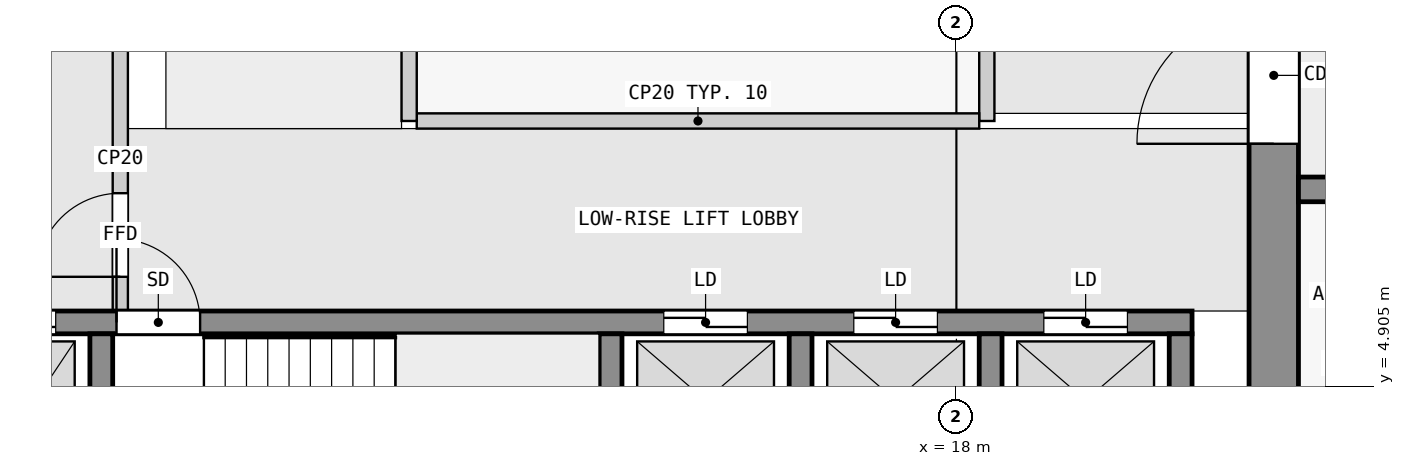
"""IFC4 building model, lengths in metres.
Left out: names, types, materials, properties, quantities, classifications, styles, units other than length and angle.
Written with IfcOpenShell. Run it as: python <this file> out.ifc"""

import sys

from ifc_helpers import new_model, si_unit, direction, frame, frame_2d, origin, place, context, subcontext, project, spatial, rectangle, extrude, element, fill, save


model = new_model("IFC4")
c1 = context("Model", 3, precision=1e-05, world=origin(), true_north=direction((0.0, 1.0)))
c2 = subcontext(c1, "Body", "Model", "MODEL_VIEW")
j1 = project(units=[si_unit("LENGTHUNIT", "METRE"), si_unit("PLANEANGLEUNIT", "RADIAN")], contexts=[c1])
p1 = place(None, origin())
s1 = spatial("IfcSite", under=j1, at=p1, CompositionType="ELEMENT")
p2 = place(p1, origin())
s2 = spatial("IfcBuilding", under=s1, at=p2, CompositionType="ELEMENT")
p3 = place(p2, frame((0.0, 0.0, 102.8)))
s3 = spatial("IfcBuildingStorey", under=s2, at=p3, CompositionType="ELEMENT", Elevation=102.8)
p4 = place(p3, frame((22.175, 2.5, 0.0), z_axis=(0.0, 0.0, 1.0), x_axis=(0.0, 1.0, 0.0)))
e1 = element("IfcWall", 1, at=p4, inside=s3, PredefinedType="SHEAR", context=c2, shape_type="SweptSolid", body=[
    extrude(rectangle(XDim=14.85, YDim=0.65, at=frame_2d((7.425, 0.0))), origin(), (0.0, 0.0, 1.0), 3.25),
])
p5 = place(p4, frame((5.6, 0.0, 0.0)))
e2 = element("IfcOpeningElement", 2, at=p5, cuts=e1, PredefinedType="OPENING", context=c2, shape_type="SweptSolid", body=[
    extrude(rectangle(XDim=1.8, YDim=2.1, at=frame_2d((0.9, 1.05))), frame((0.0, 0.335, 0.0), z_axis=(0.0, -1.0, 0.0), x_axis=(1.0, 0.0, 0.0)), (0.0, 0.0, 1.0), 0.67),
])
for number, where, z_axis, x_axis in (
    (3, (6.75, 2.8, 0.0), (0.0, 0.0, 1.0), (0.0, 1.0, 0.0)),
    (4, (13.45, 2.8, 0.0), (0.0, 0.0, 1.0), (0.0, 1.0, 0.0)),
    (5, (15.95, 2.8, 0.0), (0.0, 0.0, 1.0), (0.0, 1.0, 0.0)),
    (6, (18.45, 2.8, 0.0), (0.0, 0.0, 1.0), (0.0, 1.0, 0.0)),
    (7, (20.95, 2.8, 0.0), (0.0, 0.0, 1.0), (0.0, 1.0, 0.0)),
):
    element("IfcWall", number, at=place(p3, frame(where, z_axis=z_axis, x_axis=x_axis)), inside=s3, PredefinedType="SHEAR", context=c2, shape_type="SweptSolid", body=[
        extrude(rectangle(XDim=2.8, YDim=0.3, at=frame_2d((1.4, 0.0))), origin(), (0.0, 0.0, 1.0), 3.25),
    ])
p6 = place(p3, frame((2.3, 5.75, 0.0), z_axis=(0.0, 0.0, 1.0), x_axis=(1.0, 0.0, 0.0)))
e8 = element("IfcWall", 8, at=p6, inside=s3, PredefinedType="SHEAR", context=c2, shape_type="SweptSolid", body=[
    extrude(rectangle(XDim=18.8, YDim=0.3, at=frame_2d((9.4, 0.0))), origin(), (0.0, 0.0, 1.0), 3.25),
])
p7 = place(p6, frame((4.65, 0.0, 0.0)))
e9 = element("IfcOpeningElement", 9, at=p7, cuts=e8, PredefinedType="OPENING", context=c2, shape_type="SweptSolid", body=[
    extrude(rectangle(XDim=1.1, YDim=2.1, at=frame_2d((0.55, 1.05))), frame((0.0, 0.16, 0.0), z_axis=(0.0, -1.0, 0.0), x_axis=(1.0, 0.0, 0.0)), (0.0, 0.0, 1.0), 0.32),
])
p8 = place(p6, frame((0.45, 0.0, 0.0)))
e10 = element("IfcOpeningElement", 10, at=p8, cuts=e8, PredefinedType="OPENING", context=c2, shape_type="SweptSolid", body=[
    extrude(rectangle(XDim=1.1, YDim=2.1, at=frame_2d((0.55, 1.05))), frame((0.0, 0.16, 0.0), z_axis=(0.0, -1.0, 0.0), x_axis=(1.0, 0.0, 0.0)), (0.0, 0.0, 1.0), 0.32),
])
p9 = place(p6, frame((2.75, 0.0, 0.0)))
e11 = element("IfcOpeningElement", 11, at=p9, cuts=e8, PredefinedType="OPENING", context=c2, shape_type="SweptSolid", body=[
    extrude(rectangle(XDim=1.1, YDim=2.1, at=frame_2d((0.55, 1.05))), frame((0.0, 0.16, 0.0), z_axis=(0.0, -1.0, 0.0), x_axis=(1.0, 0.0, 0.0)), (0.0, 0.0, 1.0), 0.32),
])
p10 = place(p6, frame((11.85, 0.0, 0.0)))
e12 = element("IfcOpeningElement", 12, at=p10, cuts=e8, PredefinedType="OPENING", context=c2, shape_type="SweptSolid", body=[
    extrude(rectangle(XDim=1.1, YDim=2.1, at=frame_2d((0.55, 1.05))), frame((0.0, 0.16, 0.0), z_axis=(0.0, -1.0, 0.0), x_axis=(1.0, 0.0, 0.0)), (0.0, 0.0, 1.0), 0.32),
])
p11 = place(p6, frame((14.35, 0.0, 0.0)))
e13 = element("IfcOpeningElement", 13, at=p11, cuts=e8, PredefinedType="OPENING", context=c2, shape_type="SweptSolid", body=[
    extrude(rectangle(XDim=1.1, YDim=2.1, at=frame_2d((0.55, 1.05))), frame((0.0, 0.16, 0.0), z_axis=(0.0, -1.0, 0.0), x_axis=(1.0, 0.0, 0.0)), (0.0, 0.0, 1.0), 0.32),
])
p12 = place(p6, frame((16.85, 0.0, 0.0)))
e14 = element("IfcOpeningElement", 14, at=p12, cuts=e8, PredefinedType="OPENING", context=c2, shape_type="SweptSolid", body=[
    extrude(rectangle(XDim=1.1, YDim=2.1, at=frame_2d((0.55, 1.05))), frame((0.0, 0.16, 0.0), z_axis=(0.0, -1.0, 0.0), x_axis=(1.0, 0.0, 0.0)), (0.0, 0.0, 1.0), 0.32),
])
p13 = place(p3, frame((22.5, 7.5, 0.0), z_axis=(0.0, 0.0, 1.0), x_axis=(1.0, 0.0, 0.0)))
e15 = element("IfcWall", 15, at=p13, inside=s3, PredefinedType="SHEAR", context=c2, shape_type="SweptSolid", body=[
    extrude(rectangle(XDim=22.5, YDim=0.325, at=frame_2d((11.25, 0.0))), origin(), (0.0, 0.0, 1.0), 3.25),
])
p14 = place(p13, frame((4.05, 0.0, 0.0)))
e16 = element("IfcOpeningElement", 16, at=p14, cuts=e15, PredefinedType="OPENING", context=c2, shape_type="SweptSolid", body=[
    extrude(rectangle(XDim=1.0, YDim=2.1, at=frame_2d((0.5, 1.05))), frame((0.0, 0.172, 0.0), z_axis=(0.0, -1.0, 0.0), x_axis=(1.0, 0.0, 0.0)), (0.0, 0.0, 1.0), 0.345),
])
p15 = place(p13, frame((10.75, 0.0, 0.0)))
e17 = element("IfcOpeningElement", 17, at=p15, cuts=e15, PredefinedType="OPENING", context=c2, shape_type="SweptSolid", body=[
    extrude(rectangle(XDim=1.0, YDim=2.1, at=frame_2d((0.5, 1.05))), frame((0.0, 0.172, 0.0), z_axis=(0.0, -1.0, 0.0), x_axis=(1.0, 0.0, 0.0)), (0.0, 0.0, 1.0), 0.345),
])
p16 = place(p13, frame((16.85, 0.0, 0.0)))
e18 = element("IfcOpeningElement", 18, at=p16, cuts=e15, PredefinedType="OPENING", context=c2, shape_type="SweptSolid", body=[
    extrude(rectangle(XDim=1.0, YDim=2.1, at=frame_2d((0.5, 1.05))), frame((0.0, 0.172, 0.0), z_axis=(0.0, -1.0, 0.0), x_axis=(1.0, 0.0, 0.0)), (0.0, 0.0, 1.0), 0.345),
])
p17 = place(p3, frame((7.0, 5.9, 0.0), z_axis=(0.0, 0.0, 1.0), x_axis=(0.0, 1.0, 0.0)))
e19 = element("IfcWall", 19, at=p17, inside=s3, PredefinedType="PARTITIONING", context=c2, shape_type="SweptSolid", body=[
    extrude(rectangle(XDim=4.0, YDim=0.2, at=frame_2d((2.0, 0.0))), origin(), (0.0, 0.0, 1.0), 3.25),
])
p18 = place(p17, frame((0.45, 0.0, 0.0)))
e20 = element("IfcOpeningElement", 20, at=p18, cuts=e19, PredefinedType="OPENING", context=c2, shape_type="SweptSolid", body=[
    extrude(rectangle(XDim=1.1, YDim=2.1, at=frame_2d((0.55, 1.05))), frame((0.0, 0.11, 0.0), z_axis=(0.0, -1.0, 0.0), x_axis=(1.0, 0.0, 0.0)), (0.0, 0.0, 1.0), 0.22),
])
p19 = place(p3, frame((10.8, 8.4, 0.0), z_axis=(0.0, 0.0, 1.0), x_axis=(0.0, 1.0, 0.0)))
e21 = element("IfcWall", 21, at=p19, inside=s3, PredefinedType="PARTITIONING", context=c2, shape_type="SweptSolid", body=[
    extrude(rectangle(XDim=6.2, YDim=0.2, at=frame_2d((3.1, 0.0))), origin(), (0.0, 0.0, 1.0), 3.25),
])
p20 = place(p3, frame((10.9, 8.4, 0.0), z_axis=(0.0, 0.0, 1.0), x_axis=(1.0, 0.0, 0.0)))
e22 = element("IfcWall", 22, at=p20, inside=s3, PredefinedType="PARTITIONING", context=c2, shape_type="SweptSolid", body=[
    extrude(rectangle(XDim=7.4, YDim=0.2, at=frame_2d((3.7, 0.0))), origin(), (0.0, 0.0, 1.0), 3.25),
])
p21 = place(p3, frame((18.4, 8.4, 0.0), z_axis=(0.0, 0.0, 1.0), x_axis=(0.0, 1.0, 0.0)))
e23 = element("IfcWall", 23, at=p21, inside=s3, PredefinedType="PARTITIONING", context=c2, shape_type="SweptSolid", body=[
    extrude(rectangle(XDim=6.2, YDim=0.2, at=frame_2d((3.1, 0.0))), origin(), (0.0, 0.0, 1.0), 3.25),
])
p22 = place(p21, frame((3.15, 0.0, 0.0)))
e24 = element("IfcOpeningElement", 24, at=p22, cuts=e23, PredefinedType="OPENING", context=c2, shape_type="SweptSolid", body=[
    extrude(rectangle(XDim=0.9, YDim=2.1, at=frame_2d((0.45, 1.05))), frame((0.0, 0.11, 0.0), z_axis=(0.0, -1.0, 0.0), x_axis=(1.0, 0.0, 0.0)), (0.0, 0.0, 1.0), 0.22),
])
p23 = place(p18, origin())
e25 = element("IfcDoor", 25, at=p23, inside=s3, OperationType="SINGLE_SWING_LEFT", PredefinedType="DOOR", context=c2, shape_type="SweptSolid", body=[
    extrude(rectangle(XDim=1.1, YDim=2.1, at=frame_2d((0.55, 1.05))), frame((0.0, 0.025, 0.0), z_axis=(0.0, -1.0, 0.0), x_axis=(1.0, 0.0, 0.0)), (0.0, 0.0, 1.0), 0.05),
])
fill(e20, e25)
p24 = place(p7, origin())
e26 = element("IfcDoor", 26, at=p24, inside=s3, OperationType="SINGLE_SWING_LEFT", PredefinedType="DOOR", context=c2, shape_type="SweptSolid", body=[
    extrude(rectangle(XDim=1.1, YDim=2.1, at=frame_2d((0.55, 1.05))), frame((0.0, 0.025, 0.0), z_axis=(0.0, -1.0, 0.0), x_axis=(1.0, 0.0, 0.0)), (0.0, 0.0, 1.0), 0.05),
])
fill(e9, e26)
p25 = place(p9, origin())
e27 = element("IfcDoor", 27, at=p25, inside=s3, OperationType="DOUBLE_DOOR_SLIDING", PredefinedType="DOOR", context=c2, shape_type="SweptSolid", body=[
    extrude(rectangle(XDim=1.1, YDim=2.1, at=frame_2d((0.55, 1.05))), frame((0.0, 0.025, 0.0), z_axis=(0.0, -1.0, 0.0), x_axis=(1.0, 0.0, 0.0)), (0.0, 0.0, 1.0), 0.05),
])
fill(e11, e27)
p26 = place(p10, origin())
e28 = element("IfcDoor", 28, at=p26, inside=s3, OperationType="DOUBLE_DOOR_SLIDING", PredefinedType="DOOR", context=c2, shape_type="SweptSolid", body=[
    extrude(rectangle(XDim=1.1, YDim=2.1, at=frame_2d((0.55, 1.05))), frame((0.0, 0.025, 0.0), z_axis=(0.0, -1.0, 0.0), x_axis=(1.0, 0.0, 0.0)), (0.0, 0.0, 1.0), 0.05),
])
fill(e12, e28)
p27 = place(p11, origin())
e29 = element("IfcDoor", 29, at=p27, inside=s3, OperationType="DOUBLE_DOOR_SLIDING", PredefinedType="DOOR", context=c2, shape_type="SweptSolid", body=[
    extrude(rectangle(XDim=1.1, YDim=2.1, at=frame_2d((0.55, 1.05))), frame((0.0, 0.025, 0.0), z_axis=(0.0, -1.0, 0.0), x_axis=(1.0, 0.0, 0.0)), (0.0, 0.0, 1.0), 0.05),
])
fill(e13, e29)
p28 = place(p12, origin())
e30 = element("IfcDoor", 30, at=p28, inside=s3, OperationType="DOUBLE_DOOR_SLIDING", PredefinedType="DOOR", context=c2, shape_type="SweptSolid", body=[
    extrude(rectangle(XDim=1.1, YDim=2.1, at=frame_2d((0.55, 1.05))), frame((0.0, 0.025, 0.0), z_axis=(0.0, -1.0, 0.0), x_axis=(1.0, 0.0, 0.0)), (0.0, 0.0, 1.0), 0.05),
])
fill(e14, e30)
p29 = place(p5, origin())
e31 = element("IfcDoor", 31, at=p29, inside=s3, OperationType="DOUBLE_DOOR_SINGLE_SWING", PredefinedType="DOOR", context=c2, shape_type="SweptSolid", body=[
    extrude(rectangle(XDim=1.8, YDim=2.1, at=frame_2d((0.9, 1.05))), frame((0.0, 0.025, 0.0), z_axis=(0.0, -1.0, 0.0), x_axis=(1.0, 0.0, 0.0)), (0.0, 0.0, 1.0), 0.05),
])
fill(e2, e31)
save(model, sys.argv[1])
